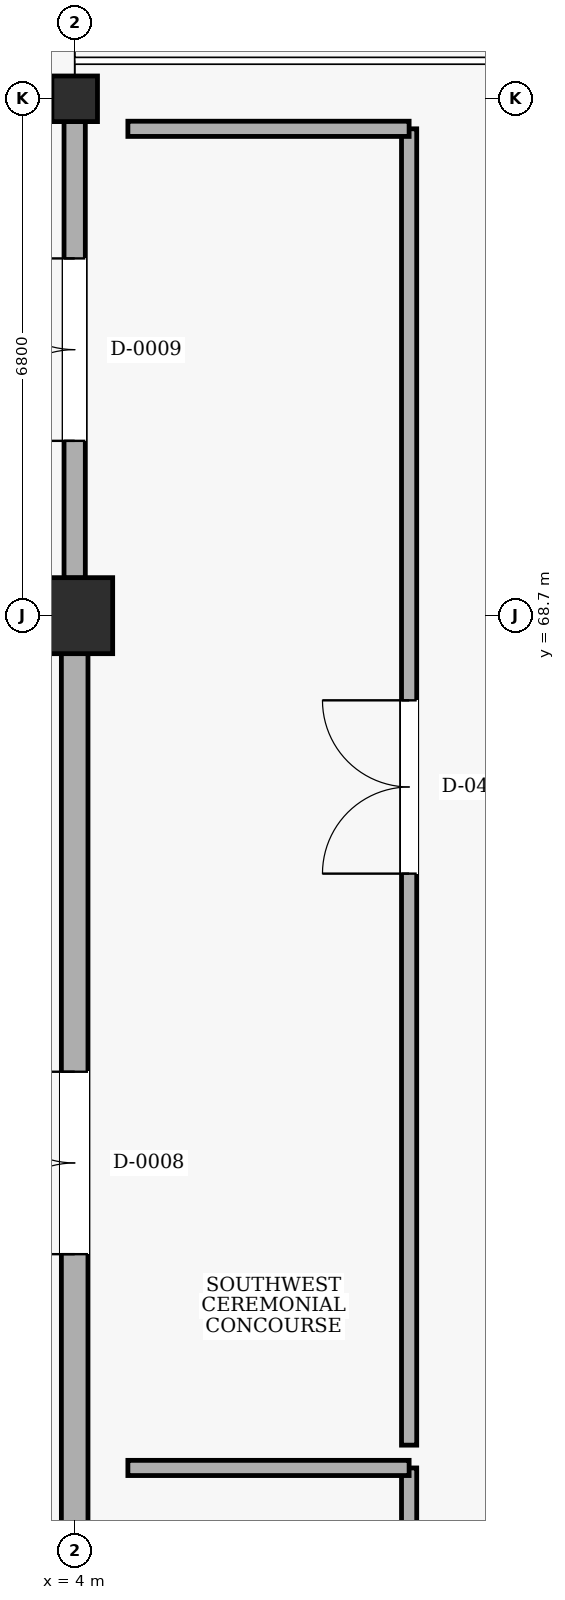
"""IFC4 building model, lengths in metres.
Left out: names, types, materials, properties, quantities, classifications, styles, units other than length and angle.
Written with IfcOpenShell. Run it as: python <this file> out.ifc"""

import sys

from ifc_helpers import new_model, si_unit, direction, frame, frame_2d, origin, origin_2d, place, context, subcontext, project, spatial, rectangle, extrude, element, fill, save


model = new_model("IFC4")
c1 = context("Model", 3, precision=1e-05, world=origin(), true_north=direction((0.0, 1.0)))
c2 = subcontext(c1, "Body", "Model", "MODEL_VIEW")
j1 = project(units=[si_unit("LENGTHUNIT", "METRE"), si_unit("PLANEANGLEUNIT", "RADIAN")], contexts=[c1])
p1 = place(None, origin())
s1 = spatial("IfcSite", under=j1, at=p1, CompositionType="ELEMENT")
p2 = place(p1, origin())
s2 = spatial("IfcBuilding", under=s1, at=p2, CompositionType="ELEMENT")
p3 = place(p2, origin())
s3 = spatial("IfcBuildingStorey", under=s2, at=p3, CompositionType="ELEMENT", Elevation=0.0)
p4 = place(p3, frame((4.0, 68.7, 0.0), z_axis=(0.0, 0.0, 1.0), x_axis=(1.0, 0.0, 0.0)))
e1 = element("IfcColumn", 1, at=p4, inside=s3, PredefinedType="COLUMN", context=c2, shape_type="SweptSolid", body=[
    extrude(rectangle(XDim=1.0, YDim=1.0, at=origin_2d()), origin(), (0.0, 0.0, 1.0), 5.4),
])
p5 = place(p3, frame((4.0, 75.5, 0.0), z_axis=(0.0, 0.0, 1.0), x_axis=(1.0, 0.0, 0.0)))
e2 = element("IfcColumn", 2, at=p5, inside=s3, PredefinedType="COLUMN", context=c2, shape_type="SweptSolid", body=[
    extrude(rectangle(XDim=0.6, YDim=0.6, at=origin_2d()), origin(), (0.0, 0.0, 1.0), 5.4),
])
p6 = place(p3, frame((4.0, 54.795, 0.0), z_axis=(0.0, 0.0, 1.0), x_axis=(0.0, 1.0, 0.0)))
e3 = element("IfcWall", 3, at=p6, inside=s3, PredefinedType="SOLIDWALL", context=c2, shape_type="SweptSolid", body=[
    extrude(rectangle(XDim=13.41, YDim=0.35, at=frame_2d((6.705, 0.0))), origin(), (0.0, 0.0, 1.0), 4.61),
])
p7 = place(p6, frame((5.505, 0.0, 0.0)))
e4 = element("IfcOpeningElement", 4, at=p7, cuts=e3, PredefinedType="OPENING", context=c2, shape_type="SweptSolid", body=[
    extrude(rectangle(XDim=2.4, YDim=2.2, at=frame_2d((1.2, 1.1))), frame((0.0, 0.185, 0.0), z_axis=(0.0, -1.0, 0.0), x_axis=(1.0, 0.0, 0.0)), (0.0, 0.0, 1.0), 0.37),
])
p8 = place(p3, frame((4.0, 69.195, 0.0), z_axis=(0.0, 0.0, 1.0), x_axis=(0.0, 1.0, 0.0)))
e5 = element("IfcWall", 5, at=p8, inside=s3, PredefinedType="SOLIDWALL", context=c2, shape_type="SweptSolid", body=[
    extrude(rectangle(XDim=6.01, YDim=0.28, at=frame_2d((3.005, 0.0))), origin(), (0.0, 0.0, 1.0), 4.31),
])
p9 = place(p8, frame((1.805, 0.0, 0.0)))
e6 = element("IfcOpeningElement", 6, at=p9, cuts=e5, PredefinedType="OPENING", context=c2, shape_type="SweptSolid", body=[
    extrude(rectangle(XDim=2.4, YDim=2.2, at=frame_2d((1.2, 1.1))), frame((0.0, 0.15, 0.0), z_axis=(0.0, -1.0, 0.0), x_axis=(1.0, 0.0, 0.0)), (0.0, 0.0, 1.0), 0.3),
])
p10 = place(p3, frame((8.4, 52.18, 0.0), z_axis=(0.0, 0.0, 1.0), x_axis=(0.0, 1.0, 0.0)))
e7 = element("IfcWall", 7, at=p10, inside=s3, PredefinedType="PARTITIONING", context=c2, shape_type="SweptSolid", body=[
    extrude(rectangle(XDim=5.308, YDim=0.2, at=frame_2d((2.654, 0.0))), origin(), (0.0, 0.0, 1.0), 5.08),
])
p11 = place(p10, frame((1.574, 0.0, 0.0)))
e8 = element("IfcOpeningElement", 8, at=p11, cuts=e7, PredefinedType="OPENING", context=c2, shape_type="SweptSolid", body=[
    extrude(rectangle(XDim=2.16, YDim=2.35, at=frame_2d((1.08, 1.175))), frame((0.0, 0.11, 0.0), z_axis=(0.0, -1.0, 0.0), x_axis=(1.0, 0.0, 0.0)), (0.0, 0.0, 1.0), 0.22),
])
p12 = place(p3, frame((8.4, 57.488, 0.0), z_axis=(0.0, 0.0, 1.0), x_axis=(-1.0, 0.0, 0.0)))
e9 = element("IfcWall", 9, at=p12, inside=s3, PredefinedType="PARTITIONING", context=c2, shape_type="SweptSolid", body=[
    extrude(rectangle(XDim=3.7, YDim=0.2, at=frame_2d((1.85, 0.0))), origin(), (0.0, 0.0, 1.0), 5.08),
])
p13 = place(p3, frame((8.4, 57.788, 0.0), z_axis=(0.0, 0.0, 1.0), x_axis=(0.0, 1.0, 0.0)))
e10 = element("IfcWall", 10, at=p13, inside=s3, PredefinedType="PARTITIONING", context=c2, shape_type="SweptSolid", body=[
    extrude(rectangle(XDim=17.317, YDim=0.2, at=frame_2d((8.659, 0.0))), origin(), (0.0, 0.0, 1.0), 5.08),
])
p14 = place(p13, frame((7.519, 0.0, 0.0)))
e11 = element("IfcOpeningElement", 11, at=p14, cuts=e10, PredefinedType="OPENING", context=c2, shape_type="SweptSolid", body=[
    extrude(rectangle(XDim=2.28, YDim=2.4, at=frame_2d((1.14, 1.2))), frame((0.0, 0.11, 0.0), z_axis=(0.0, -1.0, 0.0), x_axis=(1.0, 0.0, 0.0)), (0.0, 0.0, 1.0), 0.22),
])
p15 = place(p3, frame((8.4, 75.105, 0.0), z_axis=(0.0, 0.0, 1.0), x_axis=(-1.0, 0.0, 0.0)))
e12 = element("IfcWall", 12, at=p15, inside=s3, PredefinedType="PARTITIONING", context=c2, shape_type="SweptSolid", body=[
    extrude(rectangle(XDim=3.7, YDim=0.2, at=frame_2d((1.85, 0.0))), origin(), (0.0, 0.0, 1.0), 4.21),
])
p16 = place(p7, origin())
e13 = element("IfcDoor", 13, at=p16, inside=s3, OperationType="DOUBLE_DOOR_SINGLE_SWING", PredefinedType="DOOR", context=c2, shape_type="SweptSolid", body=[
    extrude(rectangle(XDim=2.4, YDim=2.2, at=frame_2d((1.2, 1.1))), frame((0.0, 0.025, 0.0), z_axis=(0.0, -1.0, 0.0), x_axis=(1.0, 0.0, 0.0)), (0.0, 0.0, 1.0), 0.05),
])
fill(e4, e13)
p17 = place(p9, origin())
e14 = element("IfcDoor", 14, at=p17, inside=s3, OperationType="DOUBLE_DOOR_SINGLE_SWING", PredefinedType="DOOR", context=c2, shape_type="SweptSolid", body=[
    extrude(rectangle(XDim=2.4, YDim=2.2, at=frame_2d((1.2, 1.1))), frame((0.0, 0.025, 0.0), z_axis=(0.0, -1.0, 0.0), x_axis=(1.0, 0.0, 0.0)), (0.0, 0.0, 1.0), 0.05),
])
fill(e6, e14)
p18 = place(p14, origin())
e15 = element("IfcDoor", 15, at=p18, inside=s3, OperationType="DOUBLE_DOOR_SINGLE_SWING", PredefinedType="DOOR", context=c2, shape_type="SweptSolid", body=[
    extrude(rectangle(XDim=2.28, YDim=2.4, at=frame_2d((1.14, 1.2))), frame((0.0, 0.025, 0.0), z_axis=(0.0, -1.0, 0.0), x_axis=(1.0, 0.0, 0.0)), (0.0, 0.0, 1.0), 0.05),
])
fill(e11, e15)
save(model, sys.argv[1])
